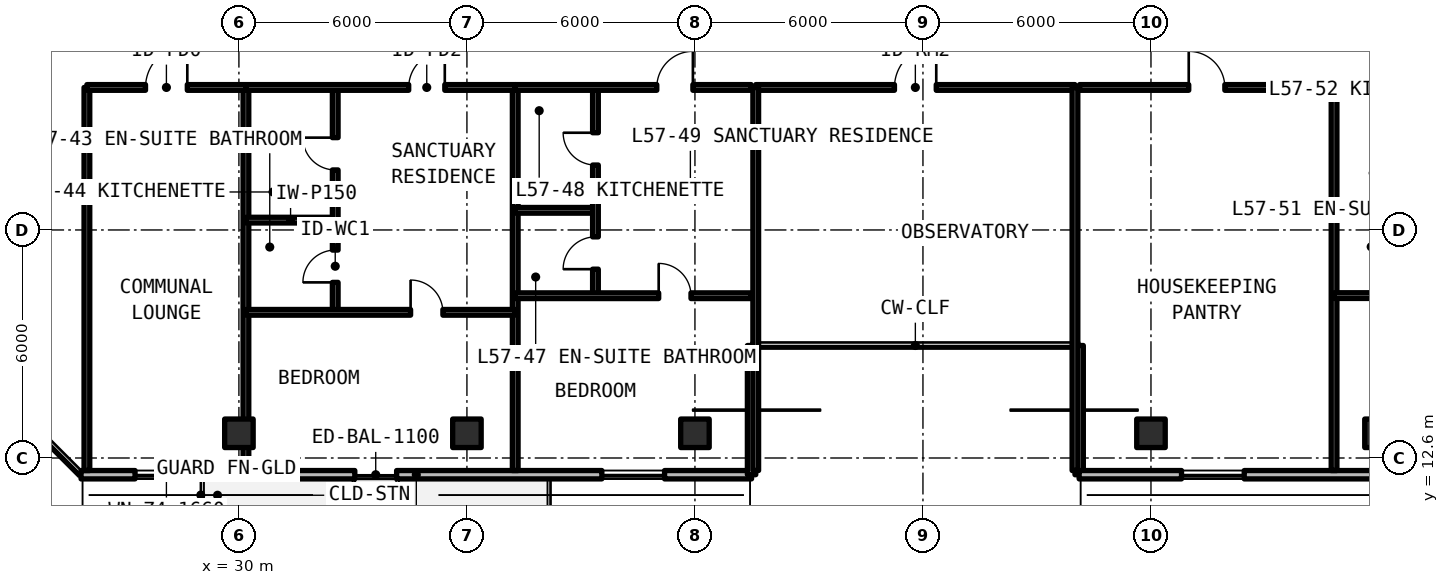
"""IFC4 building model, lengths in metres.
Left out: names, types, materials, properties, quantities, classifications, styles, units other than length and angle.
Written with IfcOpenShell. Run it as: python <this file> out.ifc"""

import sys

from ifc_helpers import new_model, si_unit, direction, frame, frame_2d, origin, origin_2d, place, context, subcontext, project, spatial, rectangle, extrude, element, fill, save


model = new_model("IFC4")
c1 = context("Model", 3, precision=1e-05, world=origin(), true_north=direction((0.0, 1.0)))
c2 = subcontext(c1, "Body", "Model", "MODEL_VIEW")
j1 = project(units=[si_unit("LENGTHUNIT", "METRE"), si_unit("PLANEANGLEUNIT", "RADIAN")], contexts=[c1])
p1 = place(None, origin())
s1 = spatial("IfcSite", under=j1, at=p1, CompositionType="ELEMENT")
p2 = place(p1, origin())
s2 = spatial("IfcBuilding", under=s1, at=p2, CompositionType="ELEMENT")
p3 = place(p2, frame((0.0, 0.0, 204.93)))
s3 = spatial("IfcBuildingStorey", under=s2, at=p3, CompositionType="ELEMENT", Elevation=204.93)
for number, where, z_axis, x_axis in (
    (1, (30.0, 13.25, 0.0), (0.0, 0.0, 1.0), (1.0, 0.0, 0.0)),
    (2, (36.0, 13.25, 0.0), (0.0, 0.0, 1.0), (1.0, 0.0, 0.0)),
    (3, (42.0, 13.25, 0.0), (0.0, 0.0, 1.0), (1.0, 0.0, 0.0)),
    (4, (54.0, 13.25, 0.0), (0.0, 0.0, 1.0), (1.0, 0.0, 0.0)),
    (5, (60.0, 13.25, 0.0), (0.0, 0.0, 1.0), (1.0, 0.0, 0.0)),
):
    element("IfcColumn", number, at=place(p3, frame(where, z_axis=z_axis, x_axis=x_axis)), inside=s3, PredefinedType="COLUMN", context=c2, shape_type="SweptSolid", body=[
        extrude(rectangle(XDim=0.75, YDim=0.75, at=origin_2d()), origin(), (0.0, 0.0, 1.0), 3.3),
    ])
p4 = place(p3, frame((25.846, 12.16, 0.0), z_axis=(0.0, 0.0, 1.0), x_axis=(1.0, 0.0, 0.0)))
e6 = element("IfcWall", 6, at=p4, inside=s3, PredefinedType="SOLIDWALL", context=c2, shape_type="SweptSolid", body=[
    extrude(rectangle(XDim=17.644, YDim=0.22, at=frame_2d((8.822, 0.0))), origin(), (0.0, 0.0, 1.0), 3.08),
])
p5 = place(p4, frame((7.204, 0.0, 0.0)))
e7 = element("IfcOpeningElement", 7, at=p5, cuts=e6, PredefinedType="OPENING", context=c2, shape_type="SweptSolid", body=[
    extrude(rectangle(XDim=1.1, YDim=2.15, at=frame_2d((0.55, 1.075))), frame((0.0, 0.12, 0.0), z_axis=(0.0, -1.0, 0.0), x_axis=(1.0, 0.0, 0.0)), (0.0, 0.0, 1.0), 0.24),
])
p6 = place(p4, frame((1.422, 0.0, 0.78)))
e8 = element("IfcOpeningElement", 8, at=p6, cuts=e6, PredefinedType="OPENING", context=c2, shape_type="SweptSolid", body=[
    extrude(rectangle(XDim=1.65, YDim=1.66, at=frame_2d((0.825, 0.83))), frame((0.0, 0.12, 0.0), z_axis=(0.0, -1.0, 0.0), x_axis=(1.0, 0.0, 0.0)), (0.0, 0.0, 1.0), 0.24),
])
p7 = place(p4, frame((13.705, 0.0, 0.78)))
e9 = element("IfcOpeningElement", 9, at=p7, cuts=e6, PredefinedType="OPENING", context=c2, shape_type="SweptSolid", body=[
    extrude(rectangle(XDim=1.65, YDim=1.66, at=frame_2d((0.825, 0.83))), frame((0.0, 0.12, 0.0), z_axis=(0.0, -1.0, 0.0), x_axis=(1.0, 0.0, 0.0)), (0.0, 0.0, 1.0), 0.24),
])
for number, where, z_axis, x_axis in (
    (10, (43.49, 12.16, 0.0), (0.0, 0.0, 1.0), (0.0, 1.0, 0.0)),
    (11, (52.11, 15.56, 0.0), (0.0, 0.0, 1.0), (0.0, -1.0, 0.0)),
):
    element("IfcWall", number, at=place(p3, frame(where, z_axis=z_axis, x_axis=x_axis)), inside=s3, PredefinedType="SOLIDWALL", context=c2, shape_type="SweptSolid", body=[
        extrude(rectangle(XDim=3.4, YDim=0.22, at=frame_2d((1.7, 0.0))), origin(), (0.0, 0.0, 1.0), 3.08),
    ])
p8 = place(p3, frame((52.11, 12.16, 0.0), z_axis=(0.0, 0.0, 1.0), x_axis=(1.0, 0.0, 0.0)))
e12 = element("IfcWall", 12, at=p8, inside=s3, PredefinedType="SOLIDWALL", context=c2, shape_type="SweptSolid", body=[
    extrude(rectangle(XDim=43.244, YDim=0.22, at=frame_2d((21.622, 0.0))), origin(), (0.0, 0.0, 1.0), 3.08),
])
p9 = place(p8, frame((15.74, 0.0, 0.0)))
e13 = element("IfcOpeningElement", 13, at=p9, cuts=e12, PredefinedType="OPENING", context=c2, shape_type="SweptSolid", body=[
    extrude(rectangle(XDim=1.1, YDim=2.15, at=frame_2d((0.55, 1.075))), frame((0.0, 0.12, 0.0), z_axis=(0.0, -1.0, 0.0), x_axis=(1.0, 0.0, 0.0)), (0.0, 0.0, 1.0), 0.24),
])
p10 = place(p8, frame((27.59, 0.0, 0.0)))
e14 = element("IfcOpeningElement", 14, at=p10, cuts=e12, PredefinedType="OPENING", context=c2, shape_type="SweptSolid", body=[
    extrude(rectangle(XDim=1.1, YDim=2.15, at=frame_2d((0.55, 1.075))), frame((0.0, 0.12, 0.0), z_axis=(0.0, -1.0, 0.0), x_axis=(1.0, 0.0, 0.0)), (0.0, 0.0, 1.0), 0.24),
])
p11 = place(p8, frame((2.694, 0.0, 0.78)))
e15 = element("IfcOpeningElement", 15, at=p11, cuts=e12, PredefinedType="OPENING", context=c2, shape_type="SweptSolid", body=[
    extrude(rectangle(XDim=1.65, YDim=1.66, at=frame_2d((0.825, 0.83))), frame((0.0, 0.12, 0.0), z_axis=(0.0, -1.0, 0.0), x_axis=(1.0, 0.0, 0.0)), (0.0, 0.0, 1.0), 0.24),
])
p12 = place(p8, frame((9.097, 0.0, 0.78)))
e16 = element("IfcOpeningElement", 16, at=p12, cuts=e12, PredefinedType="OPENING", context=c2, shape_type="SweptSolid", body=[
    extrude(rectangle(XDim=1.65, YDim=1.66, at=frame_2d((0.825, 0.83))), frame((0.0, 0.12, 0.0), z_axis=(0.0, -1.0, 0.0), x_axis=(1.0, 0.0, 0.0)), (0.0, 0.0, 1.0), 0.24),
])
p13 = place(p8, frame((21.351, 0.0, 0.78)))
e17 = element("IfcOpeningElement", 17, at=p13, cuts=e12, PredefinedType="OPENING", context=c2, shape_type="SweptSolid", body=[
    extrude(rectangle(XDim=1.65, YDim=1.66, at=frame_2d((0.825, 0.83))), frame((0.0, 0.12, 0.0), z_axis=(0.0, -1.0, 0.0), x_axis=(1.0, 0.0, 0.0)), (0.0, 0.0, 1.0), 0.24),
])
p14 = place(p8, frame((35.464, 0.0, 0.78)))
e18 = element("IfcOpeningElement", 18, at=p14, cuts=e12, PredefinedType="OPENING", context=c2, shape_type="SweptSolid", body=[
    extrude(rectangle(XDim=1.65, YDim=1.66, at=frame_2d((0.825, 0.83))), frame((0.0, 0.12, 0.0), z_axis=(0.0, -1.0, 0.0), x_axis=(1.0, 0.0, 0.0)), (0.0, 0.0, 1.0), 0.24),
])
p15 = place(p3, frame((43.6, 22.35, 0.0), z_axis=(0.0, 0.0, 1.0), x_axis=(1.0, 0.0, 0.0)))
e19 = element("IfcWall", 19, at=p15, inside=s3, PredefinedType="SOLIDWALL", context=c2, shape_type="SweptSolid", body=[
    extrude(rectangle(XDim=8.4, YDim=0.15, at=frame_2d((4.2, 0.0))), origin(), (0.0, 0.0, 1.0), 2.35),
])
p16 = place(p15, frame((3.65, 0.0, 0.0)))
e20 = element("IfcOpeningElement", 20, at=p16, cuts=e19, PredefinedType="OPENING", context=c2, shape_type="SweptSolid", body=[
    extrude(rectangle(XDim=1.1, YDim=2.15, at=frame_2d((0.55, 1.075))), frame((0.0, 0.085, 0.0), z_axis=(0.0, -1.0, 0.0), x_axis=(1.0, 0.0, 0.0)), (0.0, 0.0, 1.0), 0.17),
])
for number, where, z_axis, x_axis in (
    (21, (43.6, 12.27, 0.0), (0.0, 0.0, 1.0), (0.0, 1.0, 0.0)),
    (22, (52.0, 12.27, 0.0), (0.0, 0.0, 1.0), (0.0, 1.0, 0.0)),
    (23, (26.0, 12.27, 0.0), (0.0, 0.0, 1.0), (0.0, 1.0, 0.0)),
    (24, (30.184, 12.27, 0.0), (0.0, 0.0, 1.0), (0.0, 1.0, 0.0)),
):
    element("IfcWall", number, at=place(p3, frame(where, z_axis=z_axis, x_axis=x_axis)), inside=s3, PredefinedType="SOLIDWALL", context=c2, shape_type="SweptSolid", body=[
        extrude(rectangle(XDim=10.08, YDim=0.15, at=frame_2d((5.04, 0.0))), origin(), (0.0, 0.0, 1.0), 2.35),
    ])
p17 = place(p3, frame((26.0, 22.35, 0.0), z_axis=(0.0, 0.0, 1.0), x_axis=(1.0, 0.0, 0.0)))
e25 = element("IfcWall", 25, at=p17, inside=s3, PredefinedType="SOLIDWALL", context=c2, shape_type="SweptSolid", body=[
    extrude(rectangle(XDim=4.184, YDim=0.15, at=frame_2d((2.092, 0.0))), origin(), (0.0, 0.0, 1.0), 2.35),
])
p18 = place(p17, frame((1.542, 0.0, 0.0)))
e26 = element("IfcOpeningElement", 26, at=p18, cuts=e25, PredefinedType="OPENING", context=c2, shape_type="SweptSolid", body=[
    extrude(rectangle(XDim=1.1, YDim=2.15, at=frame_2d((0.55, 1.075))), frame((0.0, 0.085, 0.0), z_axis=(0.0, -1.0, 0.0), x_axis=(1.0, 0.0, 0.0)), (0.0, 0.0, 1.0), 0.17),
])
p19 = place(p3, frame((37.271, 12.27, 0.0), z_axis=(0.0, 0.0, 1.0), x_axis=(0.0, 1.0, 0.0)))
e27 = element("IfcWall", 27, at=p19, inside=s3, PredefinedType="SOLIDWALL", context=c2, shape_type="SweptSolid", body=[
    extrude(rectangle(XDim=10.08, YDim=0.15, at=frame_2d((5.04, 0.0))), origin(), (0.0, 0.0, 1.0), 2.35),
])
p20 = place(p3, frame((30.184, 18.859, 0.0), z_axis=(0.0, 0.0, 1.0), x_axis=(1.0, 0.0, 0.0)))
e28 = element("IfcWall", 28, at=p20, inside=s3, PredefinedType="PARTITIONING", context=c2, shape_type="SweptSolid", body=[
    extrude(rectangle(XDim=2.35, YDim=0.15, at=frame_2d((1.175, 0.0))), origin(), (0.0, 0.0, 1.0), 2.35),
])
p21 = place(p3, frame((32.534, 16.433, 0.0), z_axis=(0.0, 0.0, 1.0), x_axis=(0.0, 1.0, 0.0)))
e29 = element("IfcWall", 29, at=p21, inside=s3, PredefinedType="PARTITIONING", context=c2, shape_type="SweptSolid", body=[
    extrude(rectangle(XDim=5.917, YDim=0.15, at=frame_2d((2.958, 0.0))), origin(), (0.0, 0.0, 1.0), 2.35),
])
p22 = place(p21, frame((0.788, 0.0, 0.0)))
e30 = element("IfcOpeningElement", 30, at=p22, cuts=e29, PredefinedType="OPENING", context=c2, shape_type="SweptSolid", body=[
    extrude(rectangle(XDim=0.85, YDim=2.1, at=frame_2d((0.425, 1.05))), frame((0.0, 0.085, 0.0), z_axis=(0.0, -1.0, 0.0), x_axis=(1.0, 0.0, 0.0)), (0.0, 0.0, 1.0), 0.17),
])
p23 = place(p21, frame((3.747, 0.0, 0.0)))
e31 = element("IfcOpeningElement", 31, at=p23, cuts=e29, PredefinedType="OPENING", context=c2, shape_type="SweptSolid", body=[
    extrude(rectangle(XDim=0.85, YDim=2.1, at=frame_2d((0.425, 1.05))), frame((0.0, 0.085, 0.0), z_axis=(0.0, -1.0, 0.0), x_axis=(1.0, 0.0, 0.0)), (0.0, 0.0, 1.0), 0.17),
])
p24 = place(p3, frame((30.184, 16.433, 0.0), z_axis=(0.0, 0.0, 1.0), x_axis=(1.0, 0.0, 0.0)))
e32 = element("IfcWall", 32, at=p24, inside=s3, PredefinedType="PARTITIONING", context=c2, shape_type="SweptSolid", body=[
    extrude(rectangle(XDim=7.087, YDim=0.15, at=frame_2d((3.543, 0.0))), origin(), (0.0, 0.0, 1.0), 2.35),
])
p25 = place(p24, frame((4.333, 0.0, 0.0)))
e33 = element("IfcOpeningElement", 33, at=p25, cuts=e32, PredefinedType="OPENING", context=c2, shape_type="SweptSolid", body=[
    extrude(rectangle(XDim=0.85, YDim=2.1, at=frame_2d((0.425, 1.05))), frame((0.0, 0.085, 0.0), z_axis=(0.0, -1.0, 0.0), x_axis=(1.0, 0.0, 0.0)), (0.0, 0.0, 1.0), 0.17),
])
p26 = place(p3, frame((30.184, 22.35, 0.0), z_axis=(0.0, 0.0, 1.0), x_axis=(1.0, 0.0, 0.0)))
e34 = element("IfcWall", 34, at=p26, inside=s3, PredefinedType="SOLIDWALL", context=c2, shape_type="SweptSolid", body=[
    extrude(rectangle(XDim=7.087, YDim=0.15, at=frame_2d((3.543, 0.0))), origin(), (0.0, 0.0, 1.0), 2.35),
])
p27 = place(p26, frame((4.283, 0.0, 0.0)))
e35 = element("IfcOpeningElement", 35, at=p27, cuts=e34, PredefinedType="OPENING", context=c2, shape_type="SweptSolid", body=[
    extrude(rectangle(XDim=0.95, YDim=2.15, at=frame_2d((0.475, 1.075))), frame((0.0, 0.085, 0.0), z_axis=(0.0, -1.0, 0.0), x_axis=(1.0, 0.0, 0.0)), (0.0, 0.0, 1.0), 0.17),
])
p28 = place(p3, frame((37.271, 19.117, 0.0), z_axis=(0.0, 0.0, 1.0), x_axis=(1.0, 0.0, 0.0)))
e36 = element("IfcWall", 36, at=p28, inside=s3, PredefinedType="PARTITIONING", context=c2, shape_type="SweptSolid", body=[
    extrude(rectangle(XDim=2.111, YDim=0.15, at=frame_2d((1.056, 0.0))), origin(), (0.0, 0.0, 1.0), 2.35),
])
p29 = place(p3, frame((39.382, 16.87, 0.0), z_axis=(0.0, 0.0, 1.0), x_axis=(0.0, 1.0, 0.0)))
e37 = element("IfcWall", 37, at=p29, inside=s3, PredefinedType="PARTITIONING", context=c2, shape_type="SweptSolid", body=[
    extrude(rectangle(XDim=5.48, YDim=0.15, at=frame_2d((2.74, 0.0))), origin(), (0.0, 0.0, 1.0), 2.35),
])
p30 = place(p29, frame((0.698, 0.0, 0.0)))
e38 = element("IfcOpeningElement", 38, at=p30, cuts=e37, PredefinedType="OPENING", context=c2, shape_type="SweptSolid", body=[
    extrude(rectangle(XDim=0.85, YDim=2.1, at=frame_2d((0.425, 1.05))), frame((0.0, 0.085, 0.0), z_axis=(0.0, -1.0, 0.0), x_axis=(1.0, 0.0, 0.0)), (0.0, 0.0, 1.0), 0.17),
])
p31 = place(p29, frame((3.438, 0.0, 0.0)))
e39 = element("IfcOpeningElement", 39, at=p31, cuts=e37, PredefinedType="OPENING", context=c2, shape_type="SweptSolid", body=[
    extrude(rectangle(XDim=0.85, YDim=2.1, at=frame_2d((0.425, 1.05))), frame((0.0, 0.085, 0.0), z_axis=(0.0, -1.0, 0.0), x_axis=(1.0, 0.0, 0.0)), (0.0, 0.0, 1.0), 0.17),
])
p32 = place(p3, frame((37.271, 16.87, 0.0), z_axis=(0.0, 0.0, 1.0), x_axis=(1.0, 0.0, 0.0)))
e40 = element("IfcWall", 40, at=p32, inside=s3, PredefinedType="PARTITIONING", context=c2, shape_type="SweptSolid", body=[
    extrude(rectangle(XDim=6.209, YDim=0.15, at=frame_2d((3.104, 0.0))), origin(), (0.0, 0.0, 1.0), 2.35),
])
p33 = place(p32, frame((3.775, 0.0, 0.0)))
e41 = element("IfcOpeningElement", 41, at=p33, cuts=e40, PredefinedType="OPENING", context=c2, shape_type="SweptSolid", body=[
    extrude(rectangle(XDim=0.85, YDim=2.1, at=frame_2d((0.425, 1.05))), frame((0.0, 0.085, 0.0), z_axis=(0.0, -1.0, 0.0), x_axis=(1.0, 0.0, 0.0)), (0.0, 0.0, 1.0), 0.17),
])
p34 = place(p3, frame((37.271, 22.35, 0.0), z_axis=(0.0, 0.0, 1.0), x_axis=(1.0, 0.0, 0.0)))
e42 = element("IfcWall", 42, at=p34, inside=s3, PredefinedType="SOLIDWALL", context=c2, shape_type="SweptSolid", body=[
    extrude(rectangle(XDim=6.209, YDim=0.15, at=frame_2d((3.104, 0.0))), origin(), (0.0, 0.0, 1.0), 2.35),
])
p35 = place(p34, frame((3.725, 0.0, 0.0)))
e43 = element("IfcOpeningElement", 43, at=p35, cuts=e42, PredefinedType="OPENING", context=c2, shape_type="SweptSolid", body=[
    extrude(rectangle(XDim=0.95, YDim=2.15, at=frame_2d((0.475, 1.075))), frame((0.0, 0.085, 0.0), z_axis=(0.0, -1.0, 0.0), x_axis=(1.0, 0.0, 0.0)), (0.0, 0.0, 1.0), 0.17),
])
p36 = place(p3, frame((58.818, 12.27, 0.0), z_axis=(0.0, 0.0, 1.0), x_axis=(0.0, 1.0, 0.0)))
e44 = element("IfcWall", 44, at=p36, inside=s3, PredefinedType="SOLIDWALL", context=c2, shape_type="SweptSolid", body=[
    extrude(rectangle(XDim=10.08, YDim=0.15, at=frame_2d((5.04, 0.0))), origin(), (0.0, 0.0, 1.0), 2.35),
])
p37 = place(p3, frame((52.12, 22.35, 0.0), z_axis=(0.0, 0.0, 1.0), x_axis=(1.0, 0.0, 0.0)))
e45 = element("IfcWall", 45, at=p37, inside=s3, PredefinedType="SOLIDWALL", context=c2, shape_type="SweptSolid", body=[
    extrude(rectangle(XDim=6.698, YDim=0.15, at=frame_2d((3.349, 0.0))), origin(), (0.0, 0.0, 1.0), 2.35),
])
p38 = place(p37, frame((2.874, 0.0, 0.0)))
e46 = element("IfcOpeningElement", 46, at=p38, cuts=e45, PredefinedType="OPENING", context=c2, shape_type="SweptSolid", body=[
    extrude(rectangle(XDim=0.95, YDim=2.15, at=frame_2d((0.475, 1.075))), frame((0.0, 0.085, 0.0), z_axis=(0.0, -1.0, 0.0), x_axis=(1.0, 0.0, 0.0)), (0.0, 0.0, 1.0), 0.17),
])
p39 = place(p3, frame((58.818, 19.119, 0.0), z_axis=(0.0, 0.0, 1.0), x_axis=(1.0, 0.0, 0.0)))
e47 = element("IfcWall", 47, at=p39, inside=s3, PredefinedType="PARTITIONING", context=c2, shape_type="SweptSolid", body=[
    extrude(rectangle(XDim=3.102, YDim=0.15, at=frame_2d((1.551, 0.0))), origin(), (0.0, 0.0, 1.0), 2.35),
])
p40 = place(p3, frame((58.818, 16.873, 0.0), z_axis=(0.0, 0.0, 1.0), x_axis=(1.0, 0.0, 0.0)))
e48 = element("IfcWall", 48, at=p40, inside=s3, PredefinedType="PARTITIONING", context=c2, shape_type="SweptSolid", body=[
    extrude(rectangle(XDim=12.324, YDim=0.15, at=frame_2d((6.162, 0.0))), origin(), (0.0, 0.0, 1.0), 2.35),
])
p41 = place(p40, frame((4.33, 0.0, 0.0)))
e49 = element("IfcOpeningElement", 49, at=p41, cuts=e48, PredefinedType="OPENING", context=c2, shape_type="SweptSolid", body=[
    extrude(rectangle(XDim=0.85, YDim=2.1, at=frame_2d((0.425, 1.05))), frame((0.0, 0.085, 0.0), z_axis=(0.0, -1.0, 0.0), x_axis=(1.0, 0.0, 0.0)), (0.0, 0.0, 1.0), 0.17),
])
p42 = place(p40, frame((8.941, 0.0, 0.0)))
e50 = element("IfcOpeningElement", 50, at=p42, cuts=e48, PredefinedType="OPENING", context=c2, shape_type="SweptSolid", body=[
    extrude(rectangle(XDim=0.85, YDim=2.1, at=frame_2d((0.425, 1.05))), frame((0.0, 0.085, 0.0), z_axis=(0.0, -1.0, 0.0), x_axis=(1.0, 0.0, 0.0)), (0.0, 0.0, 1.0), 0.17),
])
p43 = place(p3, frame((58.818, 22.35, 0.0), z_axis=(0.0, 0.0, 1.0), x_axis=(1.0, 0.0, 0.0)))
e51 = element("IfcWall", 51, at=p43, inside=s3, PredefinedType="SOLIDWALL", context=c2, shape_type="SweptSolid", body=[
    extrude(rectangle(XDim=12.324, YDim=0.15, at=frame_2d((6.162, 0.0))), origin(), (0.0, 0.0, 1.0), 2.35),
])
p44 = place(p43, frame((7.278, 0.0, 0.0)))
e52 = element("IfcOpeningElement", 52, at=p44, cuts=e51, PredefinedType="OPENING", context=c2, shape_type="SweptSolid", body=[
    extrude(rectangle(XDim=0.95, YDim=2.15, at=frame_2d((0.475, 1.075))), frame((0.0, 0.085, 0.0), z_axis=(0.0, -1.0, 0.0), x_axis=(1.0, 0.0, 0.0)), (0.0, 0.0, 1.0), 0.17),
])
p45 = place(p5, frame((1.1, 0.0, 0.0), z_axis=(0.0, 0.0, 1.0), x_axis=(-1.0, 0.0, 0.0)))
e53 = element("IfcDoor", 53, at=p45, inside=s3, OperationType="SINGLE_SWING_LEFT", PredefinedType="DOOR", context=c2, shape_type="SweptSolid", body=[
    extrude(rectangle(XDim=1.1, YDim=2.15, at=frame_2d((0.55, 1.075))), frame((0.0, 0.025, 0.0), z_axis=(0.0, -1.0, 0.0), x_axis=(1.0, 0.0, 0.0)), (0.0, 0.0, 1.0), 0.05),
])
fill(e7, e53)
p46 = place(p6, origin())
e54 = element("IfcWindow", 54, at=p46, inside=s3, PartitioningType="SINGLE_PANEL", PredefinedType="WINDOW", context=c2, shape_type="SweptSolid", body=[
    extrude(rectangle(XDim=1.65, YDim=1.66, at=frame_2d((0.825, 0.83))), frame((0.0, 0.03, 0.0), z_axis=(0.0, -1.0, 0.0), x_axis=(1.0, 0.0, 0.0)), (0.0, 0.0, 1.0), 0.06),
])
fill(e8, e54)
p47 = place(p7, origin())
e55 = element("IfcWindow", 55, at=p47, inside=s3, PartitioningType="SINGLE_PANEL", PredefinedType="WINDOW", context=c2, shape_type="SweptSolid", body=[
    extrude(rectangle(XDim=1.65, YDim=1.66, at=frame_2d((0.825, 0.83))), frame((0.0, 0.03, 0.0), z_axis=(0.0, -1.0, 0.0), x_axis=(1.0, 0.0, 0.0)), (0.0, 0.0, 1.0), 0.06),
])
fill(e9, e55)
p48 = place(p11, origin())
e56 = element("IfcWindow", 56, at=p48, inside=s3, PartitioningType="SINGLE_PANEL", PredefinedType="WINDOW", context=c2, shape_type="SweptSolid", body=[
    extrude(rectangle(XDim=1.65, YDim=1.66, at=frame_2d((0.825, 0.83))), frame((0.0, 0.03, 0.0), z_axis=(0.0, -1.0, 0.0), x_axis=(1.0, 0.0, 0.0)), (0.0, 0.0, 1.0), 0.06),
])
fill(e15, e56)
p49 = place(p16, origin())
e57 = element("IfcDoor", 57, at=p49, inside=s3, OperationType="SINGLE_SWING_RIGHT", PredefinedType="DOOR", context=c2, shape_type="SweptSolid", body=[
    extrude(rectangle(XDim=1.1, YDim=2.15, at=frame_2d((0.55, 1.075))), frame((0.0, 0.025, 0.0), z_axis=(0.0, -1.0, 0.0), x_axis=(1.0, 0.0, 0.0)), (0.0, 0.0, 1.0), 0.05),
])
fill(e20, e57)
p50 = place(p18, origin())
e58 = element("IfcDoor", 58, at=p50, inside=s3, OperationType="SINGLE_SWING_RIGHT", PredefinedType="DOOR", context=c2, shape_type="SweptSolid", body=[
    extrude(rectangle(XDim=1.1, YDim=2.15, at=frame_2d((0.55, 1.075))), frame((0.0, 0.025, 0.0), z_axis=(0.0, -1.0, 0.0), x_axis=(1.0, 0.0, 0.0)), (0.0, 0.0, 1.0), 0.05),
])
fill(e26, e58)
p51 = place(p22, origin())
e59 = element("IfcDoor", 59, at=p51, inside=s3, OperationType="SINGLE_SWING_LEFT", PredefinedType="DOOR", context=c2, shape_type="SweptSolid", body=[
    extrude(rectangle(XDim=0.85, YDim=2.1, at=frame_2d((0.425, 1.05))), frame((0.0, 0.025, 0.0), z_axis=(0.0, -1.0, 0.0), x_axis=(1.0, 0.0, 0.0)), (0.0, 0.0, 1.0), 0.05),
])
fill(e30, e59)
p52 = place(p23, origin())
e60 = element("IfcDoor", 60, at=p52, inside=s3, OperationType="SINGLE_SWING_RIGHT", PredefinedType="DOOR", context=c2, shape_type="SweptSolid", body=[
    extrude(rectangle(XDim=0.85, YDim=2.1, at=frame_2d((0.425, 1.05))), frame((0.0, 0.025, 0.0), z_axis=(0.0, -1.0, 0.0), x_axis=(1.0, 0.0, 0.0)), (0.0, 0.0, 1.0), 0.05),
])
fill(e31, e60)
p53 = place(p25, origin())
e61 = element("IfcDoor", 61, at=p53, inside=s3, OperationType="SINGLE_SWING_LEFT", PredefinedType="DOOR", context=c2, shape_type="SweptSolid", body=[
    extrude(rectangle(XDim=0.85, YDim=2.1, at=frame_2d((0.425, 1.05))), frame((0.0, 0.025, 0.0), z_axis=(0.0, -1.0, 0.0), x_axis=(1.0, 0.0, 0.0)), (0.0, 0.0, 1.0), 0.05),
])
fill(e33, e61)
p54 = place(p27, origin())
e62 = element("IfcDoor", 62, at=p54, inside=s3, OperationType="SINGLE_SWING_RIGHT", PredefinedType="DOOR", context=c2, shape_type="SweptSolid", body=[
    extrude(rectangle(XDim=0.95, YDim=2.15, at=frame_2d((0.475, 1.075))), frame((0.0, 0.025, 0.0), z_axis=(0.0, -1.0, 0.0), x_axis=(1.0, 0.0, 0.0)), (0.0, 0.0, 1.0), 0.05),
])
fill(e35, e62)
p55 = place(p30, origin())
e63 = element("IfcDoor", 63, at=p55, inside=s3, OperationType="SINGLE_SWING_LEFT", PredefinedType="DOOR", context=c2, shape_type="SweptSolid", body=[
    extrude(rectangle(XDim=0.85, YDim=2.1, at=frame_2d((0.425, 1.05))), frame((0.0, 0.025, 0.0), z_axis=(0.0, -1.0, 0.0), x_axis=(1.0, 0.0, 0.0)), (0.0, 0.0, 1.0), 0.05),
])
fill(e38, e63)
p56 = place(p31, origin())
e64 = element("IfcDoor", 64, at=p56, inside=s3, OperationType="SINGLE_SWING_RIGHT", PredefinedType="DOOR", context=c2, shape_type="SweptSolid", body=[
    extrude(rectangle(XDim=0.85, YDim=2.1, at=frame_2d((0.425, 1.05))), frame((0.0, 0.025, 0.0), z_axis=(0.0, -1.0, 0.0), x_axis=(1.0, 0.0, 0.0)), (0.0, 0.0, 1.0), 0.05),
])
fill(e39, e64)
p57 = place(p33, origin())
e65 = element("IfcDoor", 65, at=p57, inside=s3, OperationType="SINGLE_SWING_LEFT", PredefinedType="DOOR", context=c2, shape_type="SweptSolid", body=[
    extrude(rectangle(XDim=0.85, YDim=2.1, at=frame_2d((0.425, 1.05))), frame((0.0, 0.025, 0.0), z_axis=(0.0, -1.0, 0.0), x_axis=(1.0, 0.0, 0.0)), (0.0, 0.0, 1.0), 0.05),
])
fill(e41, e65)
p58 = place(p35, origin())
e66 = element("IfcDoor", 66, at=p58, inside=s3, OperationType="SINGLE_SWING_RIGHT", PredefinedType="DOOR", context=c2, shape_type="SweptSolid", body=[
    extrude(rectangle(XDim=0.95, YDim=2.15, at=frame_2d((0.475, 1.075))), frame((0.0, 0.025, 0.0), z_axis=(0.0, -1.0, 0.0), x_axis=(1.0, 0.0, 0.0)), (0.0, 0.0, 1.0), 0.05),
])
fill(e43, e66)
p59 = place(p38, origin())
e67 = element("IfcDoor", 67, at=p59, inside=s3, OperationType="SINGLE_SWING_LEFT", PredefinedType="DOOR", context=c2, shape_type="SweptSolid", body=[
    extrude(rectangle(XDim=0.95, YDim=2.15, at=frame_2d((0.475, 1.075))), frame((0.0, 0.025, 0.0), z_axis=(0.0, -1.0, 0.0), x_axis=(1.0, 0.0, 0.0)), (0.0, 0.0, 1.0), 0.05),
])
fill(e46, e67)
save(model, sys.argv[1])
